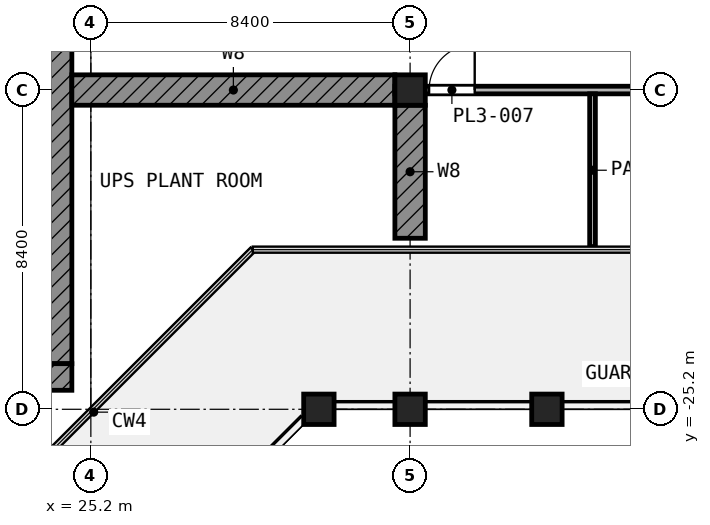
"""IFC4 building model, lengths in metres.
Left out: names, types, materials, properties, quantities, classifications, styles, units other than length and angle.
Written with IfcOpenShell. Run it as: python <this file> out.ifc"""

import sys

from ifc_helpers import new_model, si_unit, direction, frame, frame_2d, origin, origin_2d, place, context, subcontext, project, spatial, rectangle, extrude, element, fill, save


model = new_model("IFC4")
c1 = context("Model", 3, precision=1e-05, world=origin(), true_north=direction((0.0, 1.0)))
c2 = subcontext(c1, "Body", "Model", "MODEL_VIEW")
j1 = project(units=[si_unit("LENGTHUNIT", "METRE"), si_unit("PLANEANGLEUNIT", "RADIAN")], contexts=[c1])
p1 = place(None, origin())
s1 = spatial("IfcSite", under=j1, at=p1, CompositionType="ELEMENT")
p2 = place(p1, origin())
s2 = spatial("IfcBuilding", under=s1, at=p2, CompositionType="ELEMENT")
p3 = place(p2, frame((0.0, 0.0, 272.6)))
s3 = spatial("IfcBuildingStorey", under=s2, at=p3, CompositionType="ELEMENT", Elevation=272.6)
for number, where, z_axis, x_axis in (
    (1, (33.6, -16.8, 0.0), (0.0, 0.0, 1.0), (1.0, 0.0, 0.0)),
    (2, (31.2, -25.2, 0.0), (0.0, 0.0, 1.0), (1.0, 0.0, 0.0)),
    (3, (37.2, -25.2, 0.0), (0.0, 0.0, 1.0), (1.0, 0.0, 0.0)),
    (4, (33.6, -25.2, 0.0), (0.0, 0.0, 1.0), (1.0, 0.0, 0.0)),
):
    element("IfcColumn", number, at=place(p3, frame(where, z_axis=z_axis, x_axis=x_axis)), inside=s3, PredefinedType="COLUMN", context=c2, shape_type="SweptSolid", body=[
        extrude(rectangle(XDim=0.8, YDim=0.8, at=origin_2d()), origin(), (0.0, 0.0, 1.0), 5.0),
    ])
p4 = place(p3, frame((24.7, -16.8, 0.0), z_axis=(0.0, 0.0, 1.0), x_axis=(1.0, 0.0, 0.0)))
e5 = element("IfcWall", 5, at=p4, inside=s3, PredefinedType="SHEAR", context=c2, shape_type="SweptSolid", body=[
    extrude(rectangle(XDim=8.5, YDim=0.8, at=frame_2d((4.25, 0.0))), origin(), (0.0, 0.0, 1.0), 4.4),
])
p5 = place(p3, frame((33.6, -17.2, 0.0), z_axis=(0.0, 0.0, 1.0), x_axis=(0.0, -1.0, 0.0)))
e6 = element("IfcWall", 6, at=p5, inside=s3, PredefinedType="SHEAR", context=c2, shape_type="SweptSolid", body=[
    extrude(rectangle(XDim=3.5, YDim=0.8, at=frame_2d((1.75, 0.0))), origin(), (0.0, 0.0, 1.0), 4.4),
])
p6 = place(p3, frame((24.35, -24.0, 0.0), z_axis=(0.0, 0.0, 1.0), x_axis=(0.0, 1.0, 0.0)))
e7 = element("IfcWall", 7, at=p6, inside=s3, PredefinedType="SHEAR", context=c2, shape_type="SweptSolid", body=[
    extrude(rectangle(XDim=18.6, YDim=0.7, at=frame_2d((9.3, 0.0))), origin(), (0.0, 0.0, 1.0), 4.4),
])
p7 = place(p6, frame((10.5, 0.0, 0.0)))
e8 = element("IfcOpeningElement", 8, at=p7, cuts=e7, PredefinedType="OPENING", context=c2, shape_type="SweptSolid", body=[
    extrude(rectangle(XDim=1.8, YDim=2.1, at=frame_2d((0.9, 1.05))), frame((0.0, 0.36, 0.0), z_axis=(0.0, -1.0, 0.0), x_axis=(1.0, 0.0, 0.0)), (0.0, 0.0, 1.0), 0.72),
])
p8 = place(p3, frame((24.35, -24.7, 0.0), z_axis=(0.0, 0.0, 1.0), x_axis=(0.0, 1.0, 0.0)))
e9 = element("IfcWall", 9, at=p8, inside=s3, PredefinedType="SHEAR", context=c2, shape_type="SweptSolid", body=[
    extrude(rectangle(XDim=0.7, YDim=0.7, at=frame_2d((0.35, 0.0))), origin(), (0.0, 0.0, 1.0), 4.4),
])
p9 = place(p3, frame((38.4, -20.92, 0.0), z_axis=(0.0, 0.0, 1.0), x_axis=(0.0, 1.0, 0.0)))
e10 = element("IfcWall", 10, at=p9, inside=s3, PredefinedType="PARTITIONING", context=c2, shape_type="SweptSolid", body=[
    extrude(rectangle(XDim=4.02, YDim=0.15, at=frame_2d((2.01, 0.0))), origin(), (0.0, 0.0, 1.0), 4.4),
])
p10 = place(p3, frame((33.2, -16.8, 0.0), z_axis=(0.0, 0.0, 1.0), x_axis=(1.0, 0.0, 0.0)))
e11 = element("IfcWall", 11, at=p10, inside=s3, PredefinedType="PARTITIONING", context=c2, shape_type="SweptSolid", body=[
    extrude(rectangle(XDim=25.52, YDim=0.2, at=frame_2d((12.76, 0.0))), origin(), (0.0, 0.0, 1.0), 4.4),
])
p11 = place(p10, frame((0.9, 0.0, 0.0)))
e12 = element("IfcOpeningElement", 12, at=p11, cuts=e11, PredefinedType="OPENING", context=c2, shape_type="SweptSolid", body=[
    extrude(rectangle(XDim=1.2, YDim=2.1, at=frame_2d((0.6, 1.05))), frame((0.0, 0.11, 0.0), z_axis=(0.0, -1.0, 0.0), x_axis=(1.0, 0.0, 0.0)), (0.0, 0.0, 1.0), 0.22),
])
p12 = place(p10, frame((14.8, 0.0, 0.0)))
e13 = element("IfcOpeningElement", 13, at=p12, cuts=e11, PredefinedType="OPENING", context=c2, shape_type="SweptSolid", body=[
    extrude(rectangle(XDim=1.2, YDim=2.1, at=frame_2d((0.6, 1.05))), frame((0.0, 0.11, 0.0), z_axis=(0.0, -1.0, 0.0), x_axis=(1.0, 0.0, 0.0)), (0.0, 0.0, 1.0), 0.22),
])
p13 = place(p11, origin())
e14 = element("IfcDoor", 14, at=p13, inside=s3, OperationType="SINGLE_SWING_RIGHT", PredefinedType="DOOR", context=c2, shape_type="SweptSolid", body=[
    extrude(rectangle(XDim=1.2, YDim=2.1, at=frame_2d((0.6, 1.05))), frame((0.0, 0.025, 0.0), z_axis=(0.0, -1.0, 0.0), x_axis=(1.0, 0.0, 0.0)), (0.0, 0.0, 1.0), 0.05),
])
fill(e12, e14)
save(model, sys.argv[1])
